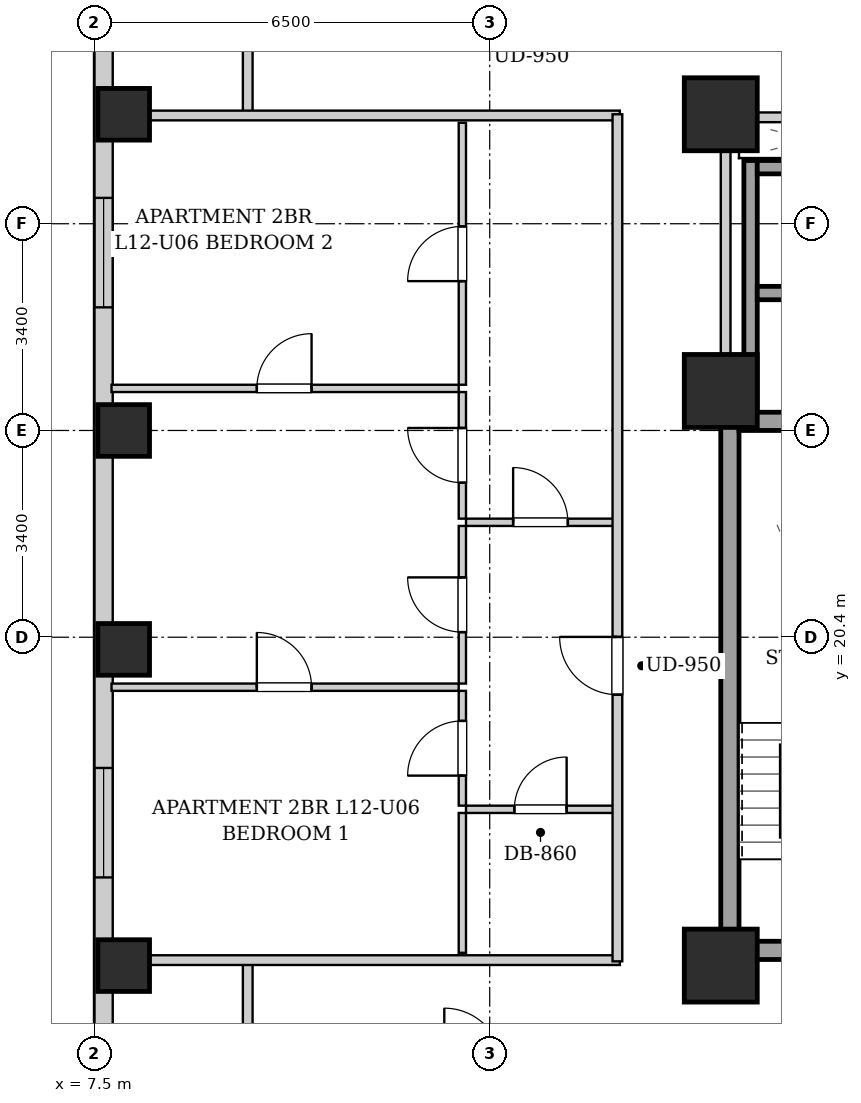
"""IFC4 building model, lengths in metres.
Left out: names, types, materials, properties, quantities, classifications, styles, units other than length and angle.
Written with IfcOpenShell. Run it as: python <this file> out.ifc"""

import sys

from ifc_helpers import new_model, si_unit, direction, frame, frame_2d, origin, origin_2d, place, context, subcontext, project, spatial, rectangle, extrude, element, fill, save


model = new_model("IFC4")
c1 = context("Model", 3, precision=1e-05, world=origin(), true_north=direction((0.0, 1.0)))
c2 = subcontext(c1, "Body", "Model", "MODEL_VIEW")
j1 = project(units=[si_unit("LENGTHUNIT", "METRE"), si_unit("PLANEANGLEUNIT", "RADIAN")], contexts=[c1])
p1 = place(None, origin())
s1 = spatial("IfcSite", under=j1, at=p1, CompositionType="ELEMENT")
p2 = place(p1, origin())
s2 = spatial("IfcBuilding", under=s1, at=p2, CompositionType="ELEMENT")
p3 = place(p2, frame((0.0, 0.0, 48.2)))
s3 = spatial("IfcBuildingStorey", under=s2, at=p3, CompositionType="ELEMENT", Elevation=48.2)
for number, where, z_axis, x_axis in (
    (1, (7.98, 15.0, 0.0), (0.0, 0.0, 1.0), (1.0, 0.0, 0.0)),
    (2, (7.98, 20.2, 0.0), (0.0, 0.0, 1.0), (1.0, 0.0, 0.0)),
    (3, (7.98, 23.8, 0.0), (0.0, 0.0, 1.0), (1.0, 0.0, 0.0)),
    (4, (7.98, 29.0, 0.0), (0.0, 0.0, 1.0), (1.0, 0.0, 0.0)),
):
    element("IfcColumn", number, at=place(p3, frame(where, z_axis=z_axis, x_axis=x_axis)), inside=s3, PredefinedType="COLUMN", context=c2, shape_type="SweptSolid", body=[
        extrude(rectangle(XDim=0.85, YDim=0.85, at=origin_2d()), origin(), (0.0, 0.0, 1.0), 3.2),
    ])
for number, where, z_axis, x_axis in (
    (5, (17.8, 15.0, 0.0), (0.0, 0.0, 1.0), (1.0, 0.0, 0.0)),
    (6, (17.8, 29.0, 0.0), (0.0, 0.0, 1.0), (1.0, 0.0, 0.0)),
    (7, (17.8, 24.45, 0.0), (0.0, 0.0, 1.0), (1.0, 0.0, 0.0)),
):
    element("IfcColumn", number, at=place(p3, frame(where, z_axis=z_axis, x_axis=x_axis)), inside=s3, PredefinedType="COLUMN", context=c2, shape_type="SweptSolid", body=[
        extrude(rectangle(XDim=1.2, YDim=1.2, at=origin_2d()), origin(), (0.0, 0.0, 1.0), 3.2),
    ])
p4 = place(p3, frame((7.65, 2.5, 0.0), z_axis=(0.0, 0.0, 1.0), x_axis=(0.0, 1.0, 0.0)))
e8 = element("IfcWall", 8, at=p4, inside=s3, PredefinedType="SOLIDWALL", context=c2, shape_type="SweptSolid", body=[
    extrude(rectangle(XDim=42.6, YDim=0.3, at=frame_2d((21.3, 0.0))), origin(), (0.0, 0.0, 1.0), 1.975),
])
p5 = place(p4, frame((3.15, 0.0, 0.55)))
e9 = element("IfcOpeningElement", 9, at=p5, cuts=e8, PredefinedType="OPENING", context=c2, shape_type="SweptSolid", body=[
    extrude(rectangle(XDim=1.8, YDim=1.2, at=frame_2d((0.9, 0.6))), frame((0.0, 0.16, 0.0), z_axis=(0.0, -1.0, 0.0), x_axis=(1.0, 0.0, 0.0)), (0.0, 0.0, 1.0), 0.32),
])
p6 = place(p4, frame((1.185, 0.0, 0.55)))
e10 = element("IfcOpeningElement", 10, at=p6, cuts=e8, PredefinedType="OPENING", context=c2, shape_type="SweptSolid", body=[
    extrude(rectangle(XDim=1.35, YDim=1.2, at=frame_2d((0.675, 0.6))), frame((0.0, 0.16, 0.0), z_axis=(0.0, -1.0, 0.0), x_axis=(1.0, 0.0, 0.0)), (0.0, 0.0, 1.0), 0.32),
])
p7 = place(p4, frame((37.085, 0.0, 0.55)))
e11 = element("IfcOpeningElement", 11, at=p7, cuts=e8, PredefinedType="OPENING", context=c2, shape_type="SweptSolid", body=[
    extrude(rectangle(XDim=1.8, YDim=1.2, at=frame_2d((0.9, 0.6))), frame((0.0, 0.16, 0.0), z_axis=(0.0, -1.0, 0.0), x_axis=(1.0, 0.0, 0.0)), (0.0, 0.0, 1.0), 0.32),
])
p8 = place(p4, frame((31.55, 0.0, 0.55)))
e12 = element("IfcOpeningElement", 12, at=p8, cuts=e8, PredefinedType="OPENING", context=c2, shape_type="SweptSolid", body=[
    extrude(rectangle(XDim=1.35, YDim=1.2, at=frame_2d((0.675, 0.6))), frame((0.0, 0.16, 0.0), z_axis=(0.0, -1.0, 0.0), x_axis=(1.0, 0.0, 0.0)), (0.0, 0.0, 1.0), 0.32),
])
p9 = place(p4, frame((13.95, 0.0, 0.55)))
e13 = element("IfcOpeningElement", 13, at=p9, cuts=e8, PredefinedType="OPENING", context=c2, shape_type="SweptSolid", body=[
    extrude(rectangle(XDim=1.8, YDim=1.2, at=frame_2d((0.9, 0.6))), frame((0.0, 0.16, 0.0), z_axis=(0.0, -1.0, 0.0), x_axis=(1.0, 0.0, 0.0)), (0.0, 0.0, 1.0), 0.32),
])
p10 = place(p4, frame((23.325, 0.0, 0.55)))
e14 = element("IfcOpeningElement", 14, at=p10, cuts=e8, PredefinedType="OPENING", context=c2, shape_type="SweptSolid", body=[
    extrude(rectangle(XDim=1.8, YDim=1.2, at=frame_2d((0.9, 0.6))), frame((0.0, 0.16, 0.0), z_axis=(0.0, -1.0, 0.0), x_axis=(1.0, 0.0, 0.0)), (0.0, 0.0, 1.0), 0.32),
])
p11 = place(p3, frame((17.95, 15.1, 0.0), z_axis=(0.0, 0.0, 1.0), x_axis=(0.0, 1.0, 0.0)))
e15 = element("IfcWall", 15, at=p11, inside=s3, PredefinedType="SHEAR", context=c2, shape_type="SweptSolid", body=[
    extrude(rectangle(XDim=9.0, YDim=0.3, at=frame_2d((4.5, 0.0))), origin(), (0.0, 0.0, 1.0), 2.94),
])
p12 = place(p3, frame((18.1, 23.95, 0.0), z_axis=(0.0, 0.0, 1.0), x_axis=(1.0, 0.0, 0.0)))
e16 = element("IfcWall", 16, at=p12, inside=s3, PredefinedType="SHEAR", context=c2, shape_type="SweptSolid", body=[
    extrude(rectangle(XDim=2.85, YDim=0.3, at=frame_2d((1.425, 0.0))), origin(), (0.0, 0.0, 1.0), 2.94),
])
p13 = place(p3, frame((18.1, 15.25, 0.0), z_axis=(0.0, 0.0, 1.0), x_axis=(1.0, 0.0, 0.0)))
e17 = element("IfcWall", 17, at=p13, inside=s3, PredefinedType="SHEAR", context=c2, shape_type="SweptSolid", body=[
    extrude(rectangle(XDim=2.85, YDim=0.3, at=frame_2d((1.425, 0.0))), origin(), (0.0, 0.0, 1.0), 2.94),
])
p14 = place(p13, frame((0.86, 0.0, 0.0)))
e18 = element("IfcOpeningElement", 18, at=p14, cuts=e17, PredefinedType="OPENING", context=c2, shape_type="SweptSolid", body=[
    extrude(rectangle(XDim=1.1, YDim=2.05, at=frame_2d((0.55, 1.025))), frame((0.0, 0.16, 0.0), z_axis=(0.0, -1.0, 0.0), x_axis=(1.0, 0.0, 0.0)), (0.0, 0.0, 1.0), 0.32),
])
p15 = place(p3, frame((18.29, 24.1, 0.0), z_axis=(0.0, 0.0, 1.0), x_axis=(0.0, 1.0, 0.0)))
e19 = element("IfcWall", 19, at=p15, inside=s3, PredefinedType="SHEAR", context=c2, shape_type="SweptSolid", body=[
    extrude(rectangle(XDim=4.14, YDim=0.22, at=frame_2d((2.07, 0.0))), origin(), (0.0, 0.0, 1.0), 2.94),
])
for number, where, z_axis, x_axis in (
    (20, (18.4, 26.06, 0.0), (0.0, 0.0, 1.0), (1.0, 0.0, 0.0)),
    (21, (18.4, 28.13, 0.0), (0.0, 0.0, 1.0), (1.0, 0.0, 0.0)),
):
    element("IfcWall", number, at=place(p3, frame(where, z_axis=z_axis, x_axis=x_axis)), inside=s3, PredefinedType="SHEAR", context=c2, shape_type="SweptSolid", body=[
        extrude(rectangle(XDim=1.9, YDim=0.22, at=frame_2d((0.95, 0.0))), origin(), (0.0, 0.0, 1.0), 2.94),
    ])
p16 = place(p3, frame((17.88, 24.12, 0.0), z_axis=(0.0, 0.0, 1.0), x_axis=(0.0, 1.0, 0.0)))
e22 = element("IfcWall", 22, at=p16, inside=s3, PredefinedType="PARTITIONING", context=c2, shape_type="SweptSolid", body=[
    extrude(rectangle(XDim=4.76, YDim=0.16, at=frame_2d((2.38, 0.0))), origin(), (0.0, 0.0, 1.0), 2.275),
])
p17 = place(p3, frame((17.96, 28.95, 0.0), z_axis=(0.0, 0.0, 1.0), x_axis=(1.0, 0.0, 0.0)))
e23 = element("IfcWall", 23, at=p17, inside=s3, PredefinedType="PARTITIONING", context=c2, shape_type="SweptSolid", body=[
    extrude(rectangle(XDim=4.29, YDim=0.16, at=frame_2d((2.145, 0.0))), origin(), (0.0, 0.0, 1.0), 2.232),
])
p18 = place(p17, frame((1.57, 0.0, 0.0)))
e24 = element("IfcOpeningElement", 24, at=p18, cuts=e23, PredefinedType="OPENING", context=c2, shape_type="SweptSolid", body=[
    extrude(rectangle(XDim=0.86, YDim=2.05, at=frame_2d((0.43, 1.025))), frame((0.0, 0.09, 0.0), z_axis=(0.0, -1.0, 0.0), x_axis=(1.0, 0.0, 0.0)), (0.0, 0.0, 1.0), 0.18),
])
for number, where, z_axis, x_axis in (
    (25, (10.02, 13.35, 0.0), (0.0, 0.0, 1.0), (0.0, 1.0, 0.0)),
    (26, (10.02, 28.98, 0.0), (0.0, 0.0, 1.0), (0.0, 1.0, 0.0)),
):
    element("IfcWall", number, at=place(p3, frame(where, z_axis=z_axis, x_axis=x_axis)), inside=s3, PredefinedType="PARTITIONING", context=c2, shape_type="SweptSolid", body=[
        extrude(rectangle(XDim=1.74, YDim=0.16, at=frame_2d((0.87, 0.0))), origin(), (0.0, 0.0, 1.0), 2.94),
    ])
for number, where, z_axis, x_axis in (
    (27, (7.78, 15.09, 0.0), (0.0, 0.0, 1.0), (1.0, 0.0, 0.0)),
    (28, (7.78, 28.98, 0.0), (0.0, 0.0, 1.0), (1.0, 0.0, 0.0)),
):
    element("IfcWall", number, at=place(p3, frame(where, z_axis=z_axis, x_axis=x_axis)), inside=s3, PredefinedType="PARTITIONING", context=c2, shape_type="SweptSolid", body=[
        extrude(rectangle(XDim=8.36, YDim=0.16, at=frame_2d((4.18, 0.0))), origin(), (0.0, 0.0, 1.0), 2.232),
    ])
p19 = place(p3, frame((13.61, 22.29, 0.0), z_axis=(0.0, 0.0, 1.0), x_axis=(1.0, 0.0, 0.0)))
e29 = element("IfcWall", 29, at=p19, inside=s3, PredefinedType="PARTITIONING", context=c2, shape_type="SweptSolid", body=[
    extrude(rectangle(XDim=2.45, YDim=0.12, at=frame_2d((1.225, 0.0))), origin(), (0.0, 0.0, 1.0), 2.94),
])
p20 = place(p19, frame((0.775, 0.0, 0.0)))
e30 = element("IfcOpeningElement", 30, at=p20, cuts=e29, PredefinedType="OPENING", context=c2, shape_type="SweptSolid", body=[
    extrude(rectangle(XDim=0.9, YDim=2.05, at=frame_2d((0.45, 1.025))), frame((0.0, 0.07, 0.0), z_axis=(0.0, -1.0, 0.0), x_axis=(1.0, 0.0, 0.0)), (0.0, 0.0, 1.0), 0.14),
])
p21 = place(p3, frame((13.55, 22.35, 0.0), z_axis=(0.0, 0.0, 1.0), x_axis=(0.0, 1.0, 0.0)))
e31 = element("IfcWall", 31, at=p21, inside=s3, PredefinedType="PARTITIONING", context=c2, shape_type="SweptSolid", body=[
    extrude(rectangle(XDim=2.082, YDim=0.12, at=frame_2d((1.041, 0.0))), origin(), (0.0, 0.0, 1.0), 2.94),
])
p22 = place(p21, frame((0.591, 0.0, 0.0)))
e32 = element("IfcOpeningElement", 32, at=p22, cuts=e31, PredefinedType="OPENING", context=c2, shape_type="SweptSolid", body=[
    extrude(rectangle(XDim=0.9, YDim=2.05, at=frame_2d((0.45, 1.025))), frame((0.0, 0.07, 0.0), z_axis=(0.0, -1.0, 0.0), x_axis=(1.0, 0.0, 0.0)), (0.0, 0.0, 1.0), 0.14),
])
p23 = place(p3, frame((13.55, 24.552, 0.0), z_axis=(0.0, 0.0, 1.0), x_axis=(0.0, 1.0, 0.0)))
e33 = element("IfcWall", 33, at=p23, inside=s3, PredefinedType="PARTITIONING", context=c2, shape_type="SweptSolid", body=[
    extrude(rectangle(XDim=4.308, YDim=0.12, at=frame_2d((2.154, 0.0))), origin(), (0.0, 0.0, 1.0), 2.94),
])
p24 = place(p23, frame((1.704, 0.0, 0.0)))
e34 = element("IfcOpeningElement", 34, at=p24, cuts=e33, PredefinedType="OPENING", context=c2, shape_type="SweptSolid", body=[
    extrude(rectangle(XDim=0.9, YDim=2.05, at=frame_2d((0.45, 1.025))), frame((0.0, 0.07, 0.0), z_axis=(0.0, -1.0, 0.0), x_axis=(1.0, 0.0, 0.0)), (0.0, 0.0, 1.0), 0.14),
])
p25 = place(p3, frame((13.61, 17.57, 0.0), z_axis=(0.0, 0.0, 1.0), x_axis=(1.0, 0.0, 0.0)))
e35 = element("IfcWall", 35, at=p25, inside=s3, PredefinedType="PARTITIONING", context=c2, shape_type="SweptSolid", body=[
    extrude(rectangle(XDim=2.45, YDim=0.12, at=frame_2d((1.225, 0.0))), origin(), (0.0, 0.0, 1.0), 2.94),
])
p26 = place(p25, frame((0.795, 0.0, 0.0)))
e36 = element("IfcOpeningElement", 36, at=p26, cuts=e35, PredefinedType="OPENING", context=c2, shape_type="SweptSolid", body=[
    extrude(rectangle(XDim=0.86, YDim=2.05, at=frame_2d((0.43, 1.025))), frame((0.0, 0.07, 0.0), z_axis=(0.0, -1.0, 0.0), x_axis=(1.0, 0.0, 0.0)), (0.0, 0.0, 1.0), 0.14),
])
p27 = place(p3, frame((13.55, 15.21, 0.0), z_axis=(0.0, 0.0, 1.0), x_axis=(0.0, 1.0, 0.0)))
e37 = element("IfcWall", 37, at=p27, inside=s3, PredefinedType="PARTITIONING", context=c2, shape_type="SweptSolid", body=[
    extrude(rectangle(XDim=2.3, YDim=0.12, at=frame_2d((1.15, 0.0))), origin(), (0.0, 0.0, 1.0), 2.94),
])
p28 = place(p3, frame((13.55, 17.63, 0.0), z_axis=(0.0, 0.0, 1.0), x_axis=(0.0, 1.0, 0.0)))
e38 = element("IfcWall", 38, at=p28, inside=s3, PredefinedType="PARTITIONING", context=c2, shape_type="SweptSolid", body=[
    extrude(rectangle(XDim=1.888, YDim=0.12, at=frame_2d((0.944, 0.0))), origin(), (0.0, 0.0, 1.0), 2.94),
])
p29 = place(p28, frame((0.494, 0.0, 0.0)))
e39 = element("IfcOpeningElement", 39, at=p29, cuts=e38, PredefinedType="OPENING", context=c2, shape_type="SweptSolid", body=[
    extrude(rectangle(XDim=0.9, YDim=2.05, at=frame_2d((0.45, 1.025))), frame((0.0, 0.07, 0.0), z_axis=(0.0, -1.0, 0.0), x_axis=(1.0, 0.0, 0.0)), (0.0, 0.0, 1.0), 0.14),
])
p30 = place(p3, frame((13.55, 19.638, 0.0), z_axis=(0.0, 0.0, 1.0), x_axis=(0.0, 1.0, 0.0)))
e40 = element("IfcWall", 40, at=p30, inside=s3, PredefinedType="PARTITIONING", context=c2, shape_type="SweptSolid", body=[
    extrude(rectangle(XDim=2.592, YDim=0.12, at=frame_2d((1.296, 0.0))), origin(), (0.0, 0.0, 1.0), 2.94),
])
p31 = place(p30, frame((0.846, 0.0, 0.0)))
e41 = element("IfcOpeningElement", 41, at=p31, cuts=e40, PredefinedType="OPENING", context=c2, shape_type="SweptSolid", body=[
    extrude(rectangle(XDim=0.9, YDim=2.05, at=frame_2d((0.45, 1.025))), frame((0.0, 0.07, 0.0), z_axis=(0.0, -1.0, 0.0), x_axis=(1.0, 0.0, 0.0)), (0.0, 0.0, 1.0), 0.14),
])
p32 = place(p3, frame((7.78, 19.578, 0.0), z_axis=(0.0, 0.0, 1.0), x_axis=(1.0, 0.0, 0.0)))
e42 = element("IfcWall", 42, at=p32, inside=s3, PredefinedType="PARTITIONING", context=c2, shape_type="SweptSolid", body=[
    extrude(rectangle(XDim=5.71, YDim=0.12, at=frame_2d((2.855, 0.0))), origin(), (0.0, 0.0, 1.0), 2.94),
])
p33 = place(p32, frame((2.39, 0.0, 0.0)))
e43 = element("IfcOpeningElement", 43, at=p33, cuts=e42, PredefinedType="OPENING", context=c2, shape_type="SweptSolid", body=[
    extrude(rectangle(XDim=0.9, YDim=2.05, at=frame_2d((0.45, 1.025))), frame((0.0, 0.07, 0.0), z_axis=(0.0, -1.0, 0.0), x_axis=(1.0, 0.0, 0.0)), (0.0, 0.0, 1.0), 0.14),
])
p34 = place(p3, frame((7.78, 24.492, 0.0), z_axis=(0.0, 0.0, 1.0), x_axis=(1.0, 0.0, 0.0)))
e44 = element("IfcWall", 44, at=p34, inside=s3, PredefinedType="PARTITIONING", context=c2, shape_type="SweptSolid", body=[
    extrude(rectangle(XDim=5.71, YDim=0.12, at=frame_2d((2.855, 0.0))), origin(), (0.0, 0.0, 1.0), 2.508),
])
p35 = place(p34, frame((2.39, 0.0, 0.0)))
e45 = element("IfcOpeningElement", 45, at=p35, cuts=e44, PredefinedType="OPENING", context=c2, shape_type="SweptSolid", body=[
    extrude(rectangle(XDim=0.9, YDim=2.05, at=frame_2d((0.45, 1.025))), frame((0.0, 0.07, 0.0), z_axis=(0.0, -1.0, 0.0), x_axis=(1.0, 0.0, 0.0)), (0.0, 0.0, 1.0), 0.14),
])
p36 = place(p3, frame((16.1, 15.07, 0.0), z_axis=(0.0, 0.0, 1.0), x_axis=(0.0, 1.0, 0.0)))
e46 = element("IfcWall", 46, at=p36, inside=s3, PredefinedType="PARTITIONING", context=c2, shape_type="SweptSolid", body=[
    extrude(rectangle(XDim=13.93, YDim=0.16, at=frame_2d((6.965, 0.0))), origin(), (0.0, 0.0, 1.0), 2.94),
])
p37 = place(p36, frame((4.385, 0.0, 0.0)))
e47 = element("IfcOpeningElement", 47, at=p37, cuts=e46, PredefinedType="OPENING", context=c2, shape_type="SweptSolid", body=[
    extrude(rectangle(XDim=0.95, YDim=2.1, at=frame_2d((0.475, 1.05))), frame((0.0, 0.09, 0.0), z_axis=(0.0, -1.0, 0.0), x_axis=(1.0, 0.0, 0.0)), (0.0, 0.0, 1.0), 0.18),
])
p38 = place(p20, origin())
e48 = element("IfcDoor", 48, at=p38, inside=s3, OperationType="SINGLE_SWING_LEFT", PredefinedType="DOOR", context=c2, shape_type="SweptSolid", body=[
    extrude(rectangle(XDim=0.9, YDim=2.05, at=frame_2d((0.45, 1.025))), frame((0.0, 0.025, 0.0), z_axis=(0.0, -1.0, 0.0), x_axis=(1.0, 0.0, 0.0)), (0.0, 0.0, 1.0), 0.05),
])
fill(e30, e48)
p39 = place(p22, origin())
e49 = element("IfcDoor", 49, at=p39, inside=s3, OperationType="SINGLE_SWING_RIGHT", PredefinedType="DOOR", context=c2, shape_type="SweptSolid", body=[
    extrude(rectangle(XDim=0.9, YDim=2.05, at=frame_2d((0.45, 1.025))), frame((0.0, 0.025, 0.0), z_axis=(0.0, -1.0, 0.0), x_axis=(1.0, 0.0, 0.0)), (0.0, 0.0, 1.0), 0.05),
])
fill(e32, e49)
p40 = place(p24, origin())
e50 = element("IfcDoor", 50, at=p40, inside=s3, OperationType="SINGLE_SWING_LEFT", PredefinedType="DOOR", context=c2, shape_type="SweptSolid", body=[
    extrude(rectangle(XDim=0.9, YDim=2.05, at=frame_2d((0.45, 1.025))), frame((0.0, 0.025, 0.0), z_axis=(0.0, -1.0, 0.0), x_axis=(1.0, 0.0, 0.0)), (0.0, 0.0, 1.0), 0.05),
])
fill(e34, e50)
p41 = place(p26, origin())
e51 = element("IfcDoor", 51, at=p41, inside=s3, OperationType="SINGLE_SWING_RIGHT", PredefinedType="DOOR", context=c2, shape_type="SweptSolid", body=[
    extrude(rectangle(XDim=0.86, YDim=2.05, at=frame_2d((0.43, 1.025))), frame((0.0, 0.025, 0.0), z_axis=(0.0, -1.0, 0.0), x_axis=(1.0, 0.0, 0.0)), (0.0, 0.0, 1.0), 0.05),
])
fill(e36, e51)
p42 = place(p29, origin())
e52 = element("IfcDoor", 52, at=p42, inside=s3, OperationType="SINGLE_SWING_LEFT", PredefinedType="DOOR", context=c2, shape_type="SweptSolid", body=[
    extrude(rectangle(XDim=0.9, YDim=2.05, at=frame_2d((0.45, 1.025))), frame((0.0, 0.025, 0.0), z_axis=(0.0, -1.0, 0.0), x_axis=(1.0, 0.0, 0.0)), (0.0, 0.0, 1.0), 0.05),
])
fill(e39, e52)
p43 = place(p31, origin())
e53 = element("IfcDoor", 53, at=p43, inside=s3, OperationType="SINGLE_SWING_RIGHT", PredefinedType="DOOR", context=c2, shape_type="SweptSolid", body=[
    extrude(rectangle(XDim=0.9, YDim=2.05, at=frame_2d((0.45, 1.025))), frame((0.0, 0.025, 0.0), z_axis=(0.0, -1.0, 0.0), x_axis=(1.0, 0.0, 0.0)), (0.0, 0.0, 1.0), 0.05),
])
fill(e41, e53)
p44 = place(p33, origin())
e54 = element("IfcDoor", 54, at=p44, inside=s3, OperationType="SINGLE_SWING_LEFT", PredefinedType="DOOR", context=c2, shape_type="SweptSolid", body=[
    extrude(rectangle(XDim=0.9, YDim=2.05, at=frame_2d((0.45, 1.025))), frame((0.0, 0.025, 0.0), z_axis=(0.0, -1.0, 0.0), x_axis=(1.0, 0.0, 0.0)), (0.0, 0.0, 1.0), 0.05),
])
fill(e43, e54)
p45 = place(p35, origin())
e55 = element("IfcDoor", 55, at=p45, inside=s3, OperationType="SINGLE_SWING_RIGHT", PredefinedType="DOOR", context=c2, shape_type="SweptSolid", body=[
    extrude(rectangle(XDim=0.9, YDim=2.05, at=frame_2d((0.45, 1.025))), frame((0.0, 0.025, 0.0), z_axis=(0.0, -1.0, 0.0), x_axis=(1.0, 0.0, 0.0)), (0.0, 0.0, 1.0), 0.05),
])
fill(e45, e55)
p46 = place(p37, origin())
e56 = element("IfcDoor", 56, at=p46, inside=s3, OperationType="SINGLE_SWING_RIGHT", PredefinedType="DOOR", context=c2, shape_type="SweptSolid", body=[
    extrude(rectangle(XDim=0.95, YDim=2.1, at=frame_2d((0.475, 1.05))), frame((0.0, 0.025, 0.0), z_axis=(0.0, -1.0, 0.0), x_axis=(1.0, 0.0, 0.0)), (0.0, 0.0, 1.0), 0.05),
])
fill(e47, e56)
p47 = place(p9, origin())
e57 = element("IfcWindow", 57, at=p47, inside=s3, PartitioningType="DOUBLE_PANEL_VERTICAL", PredefinedType="WINDOW", context=c2, shape_type="SweptSolid", body=[
    extrude(rectangle(XDim=1.8, YDim=1.2, at=frame_2d((0.9, 0.6))), frame((0.0, 0.03, 0.0), z_axis=(0.0, -1.0, 0.0), x_axis=(1.0, 0.0, 0.0)), (0.0, 0.0, 1.0), 0.06),
])
fill(e13, e57)
p48 = place(p10, origin())
e58 = element("IfcWindow", 58, at=p48, inside=s3, PartitioningType="DOUBLE_PANEL_VERTICAL", PredefinedType="WINDOW", context=c2, shape_type="SweptSolid", body=[
    extrude(rectangle(XDim=1.8, YDim=1.2, at=frame_2d((0.9, 0.6))), frame((0.0, 0.03, 0.0), z_axis=(0.0, -1.0, 0.0), x_axis=(1.0, 0.0, 0.0)), (0.0, 0.0, 1.0), 0.06),
])
fill(e14, e58)
save(model, sys.argv[1])
